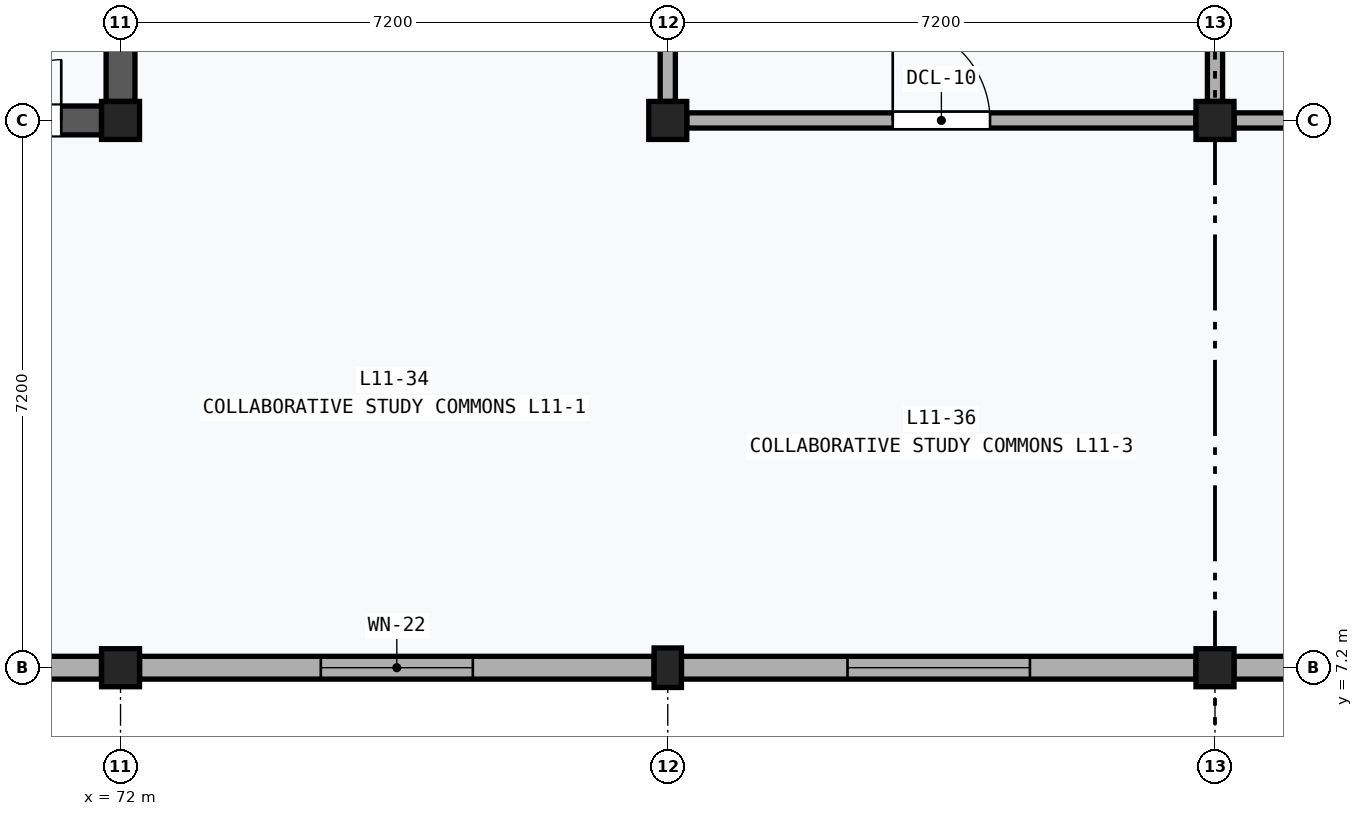
"""IFC4 building model, lengths in metres.
Left out: names, types, materials, properties, quantities, classifications, styles, units other than length and angle.
Written with IfcOpenShell. Run it as: python <this file> out.ifc"""

import sys

from ifc_helpers import new_model, si_unit, direction, frame, frame_2d, origin, origin_2d, place, context, subcontext, project, spatial, rectangle, extrude, element, fill, save


model = new_model("IFC4")
c1 = context("Model", 3, precision=1e-05, world=origin(), true_north=direction((0.0, 1.0)))
c2 = subcontext(c1, "Body", "Model", "MODEL_VIEW")
j1 = project(units=[si_unit("LENGTHUNIT", "METRE"), si_unit("PLANEANGLEUNIT", "RADIAN")], contexts=[c1])
p1 = place(None, origin())
s1 = spatial("IfcSite", under=j1, at=p1, CompositionType="ELEMENT")
p2 = place(p1, origin())
s2 = spatial("IfcBuilding", under=s1, at=p2, CompositionType="ELEMENT")
p3 = place(p2, frame((0.0, 0.0, 46.8)))
s3 = spatial("IfcBuildingStorey", under=s2, at=p3, CompositionType="ELEMENT", Elevation=46.8)
for number, where, z_axis, x_axis in (
    (1, (72.0, 7.2, 0.0), (0.0, 0.0, 1.0), (1.0, 0.0, 0.0)),
    (2, (72.0, 14.4, 0.0), (0.0, 0.0, 1.0), (1.0, 0.0, 0.0)),
):
    element("IfcColumn", number, at=place(p3, frame(where, z_axis=z_axis, x_axis=x_axis)), inside=s3, PredefinedType="COLUMN", context=c2, shape_type="SweptSolid", body=[
        extrude(rectangle(XDim=0.5, YDim=0.5, at=origin_2d()), origin(), (0.0, 0.0, 1.0), 4.2),
    ])
p4 = place(p3, frame((79.2, 7.2, 0.0), z_axis=(0.0, 0.0, 1.0), x_axis=(1.0, 0.0, 0.0)))
e3 = element("IfcColumn", 3, at=p4, inside=s3, PredefinedType="PILASTER", context=c2, shape_type="SweptSolid", body=[
    extrude(rectangle(XDim=0.36, YDim=0.52, at=origin_2d()), origin(), (0.0, 0.0, 1.0), 4.2),
])
for number, where, z_axis, x_axis in (
    (4, (79.2, 14.4, 0.0), (0.0, 0.0, 1.0), (1.0, 0.0, 0.0)),
    (5, (86.4, 7.2, 0.0), (0.0, 0.0, 1.0), (1.0, 0.0, 0.0)),
    (6, (86.4, 14.4, 0.0), (0.0, 0.0, 1.0), (1.0, 0.0, 0.0)),
):
    element("IfcColumn", number, at=place(p3, frame(where, z_axis=z_axis, x_axis=x_axis)), inside=s3, PredefinedType="COLUMN", context=c2, shape_type="SweptSolid", body=[
        extrude(rectangle(XDim=0.5, YDim=0.5, at=origin_2d()), origin(), (0.0, 0.0, 1.0), 4.2),
    ])
p5 = place(p3, frame((65.05, 7.2, 0.0), z_axis=(0.0, 0.0, 1.0), x_axis=(1.0, 0.0, 0.0)))
e7 = element("IfcWall", 7, at=p5, inside=s3, PredefinedType="SOLIDWALL", context=c2, shape_type="SweptSolid", body=[
    extrude(rectangle(XDim=6.7, YDim=0.3, at=frame_2d((3.35, 0.0))), origin(), (0.0, 0.0, 1.0), 3.37),
])
p6 = place(p5, frame((2.475, 0.0, 1.2)))
e8 = element("IfcOpeningElement", 8, at=p6, cuts=e7, PredefinedType="OPENING", context=c2, shape_type="SweptSolid", body=[
    extrude(rectangle(XDim=1.75, YDim=1.35, at=frame_2d((0.875, 0.675))), frame((0.0, 0.162, 0.0), z_axis=(0.0, -1.0, 0.0), x_axis=(1.0, 0.0, 0.0)), (0.0, 0.0, 1.0), 0.324),
])
p7 = place(p3, frame((72.25, 7.2, 0.0), z_axis=(0.0, 0.0, 1.0), x_axis=(1.0, 0.0, 0.0)))
e9 = element("IfcWall", 9, at=p7, inside=s3, PredefinedType="SOLIDWALL", context=c2, shape_type="SweptSolid", body=[
    extrude(rectangle(XDim=6.77, YDim=0.3, at=frame_2d((3.385, 0.0))), origin(), (0.0, 0.0, 1.0), 3.37),
])
p8 = place(p7, frame((2.385, 0.0, 0.7)))
e10 = element("IfcOpeningElement", 10, at=p8, cuts=e9, PredefinedType="OPENING", context=c2, shape_type="SweptSolid", body=[
    extrude(rectangle(XDim=2.0, YDim=2.2, at=frame_2d((1.0, 1.1))), frame((0.0, 0.162, 0.0), z_axis=(0.0, -1.0, 0.0), x_axis=(1.0, 0.0, 0.0)), (0.0, 0.0, 1.0), 0.324),
])
p9 = place(p3, frame((79.38, 7.2, 0.0), z_axis=(0.0, 0.0, 1.0), x_axis=(1.0, 0.0, 0.0)))
e11 = element("IfcWall", 11, at=p9, inside=s3, PredefinedType="SOLIDWALL", context=c2, shape_type="SweptSolid", body=[
    extrude(rectangle(XDim=6.77, YDim=0.3, at=frame_2d((3.385, 0.0))), origin(), (0.0, 0.0, 1.0), 3.37),
])
p10 = place(p9, frame((2.185, 0.0, 0.7)))
e12 = element("IfcOpeningElement", 12, at=p10, cuts=e11, PredefinedType="OPENING", context=c2, shape_type="SweptSolid", body=[
    extrude(rectangle(XDim=2.4, YDim=2.2, at=frame_2d((1.2, 1.1))), frame((0.0, 0.162, 0.0), z_axis=(0.0, -1.0, 0.0), x_axis=(1.0, 0.0, 0.0)), (0.0, 0.0, 1.0), 0.324),
])
p11 = place(p3, frame((86.65, 7.2, 0.0), z_axis=(0.0, 0.0, 1.0), x_axis=(1.0, 0.0, 0.0)))
e13 = element("IfcWall", 13, at=p11, inside=s3, PredefinedType="SOLIDWALL", context=c2, shape_type="SweptSolid", body=[
    extrude(rectangle(XDim=6.7, YDim=0.3, at=frame_2d((3.35, 0.0))), origin(), (0.0, 0.0, 1.0), 3.37),
])
p12 = place(p11, frame((1.95, 0.0, 0.7)))
e14 = element("IfcOpeningElement", 14, at=p12, cuts=e13, PredefinedType="OPENING", context=c2, shape_type="SweptSolid", body=[
    extrude(rectangle(XDim=2.8, YDim=2.2, at=frame_2d((1.4, 1.1))), frame((0.0, 0.162, 0.0), z_axis=(0.0, -1.0, 0.0), x_axis=(1.0, 0.0, 0.0)), (0.0, 0.0, 1.0), 0.324),
])
p13 = place(p3, frame((72.0, 14.65, 0.0), z_axis=(0.0, 0.0, 1.0), x_axis=(0.0, 1.0, 0.0)))
e15 = element("IfcWall", 15, at=p13, inside=s3, PredefinedType="SHEAR", context=c2, shape_type="SweptSolid", body=[
    extrude(rectangle(XDim=6.7, YDim=0.38, at=frame_2d((3.35, 0.0))), origin(), (0.0, 0.0, 1.0), 3.29),
])
p14 = place(p13, frame((2.2, 0.0, 0.0)))
e16 = element("IfcOpeningElement", 16, at=p14, cuts=e15, PredefinedType="OPENING", context=c2, shape_type="SweptSolid", body=[
    extrude(rectangle(XDim=1.6, YDim=2.2, at=frame_2d((0.8, 1.1))), frame((0.0, 0.202, 0.0), z_axis=(0.0, -1.0, 0.0), x_axis=(1.0, 0.0, 0.0)), (0.0, 0.0, 1.0), 0.404),
])
p15 = place(p3, frame((65.05, 14.4, 0.0), z_axis=(0.0, 0.0, 1.0), x_axis=(1.0, 0.0, 0.0)))
e17 = element("IfcWall", 17, at=p15, inside=s3, PredefinedType="SHEAR", context=c2, shape_type="SweptSolid", body=[
    extrude(rectangle(XDim=6.7, YDim=0.38, at=frame_2d((3.35, 0.0))), origin(), (0.0, 0.0, 1.0), 3.29),
])
p16 = place(p15, frame((4.57, 0.0, 0.0)))
e18 = element("IfcOpeningElement", 18, at=p16, cuts=e17, PredefinedType="OPENING", context=c2, shape_type="SweptSolid", body=[
    extrude(rectangle(XDim=1.6, YDim=2.2, at=frame_2d((0.8, 1.1))), frame((0.0, 0.202, 0.0), z_axis=(0.0, -1.0, 0.0), x_axis=(1.0, 0.0, 0.0)), (0.0, 0.0, 1.0), 0.404),
])
p17 = place(p3, frame((79.45, 14.4, 0.0), z_axis=(0.0, 0.0, 1.0), x_axis=(1.0, 0.0, 0.0)))
e19 = element("IfcWall", 19, at=p17, inside=s3, PredefinedType="PARTITIONING", context=c2, shape_type="SweptSolid", body=[
    extrude(rectangle(XDim=6.7, YDim=0.2, at=frame_2d((3.35, 0.0))), origin(), (0.0, 0.0, 1.0), 3.29),
])
p18 = place(p17, frame((2.71, 0.0, 0.0)))
e20 = element("IfcOpeningElement", 20, at=p18, cuts=e19, PredefinedType="OPENING", context=c2, shape_type="SweptSolid", body=[
    extrude(rectangle(XDim=1.28, YDim=2.28, at=frame_2d((0.64, 1.14))), frame((0.0, 0.112, 0.0), z_axis=(0.0, -1.0, 0.0), x_axis=(1.0, 0.0, 0.0)), (0.0, 0.0, 1.0), 0.224),
])
for number, where, z_axis, x_axis in (
    (21, (79.2, 14.65, 0.0), (0.0, 0.0, 1.0), (0.0, 1.0, 0.0)),
    (22, (86.4, 14.65, 0.0), (0.0, 0.0, 1.0), (0.0, 1.0, 0.0)),
):
    element("IfcWall", number, at=place(p3, frame(where, z_axis=z_axis, x_axis=x_axis)), inside=s3, PredefinedType="PARTITIONING", context=c2, shape_type="SweptSolid", body=[
        extrude(rectangle(XDim=6.7, YDim=0.2, at=frame_2d((3.35, 0.0))), origin(), (0.0, 0.0, 1.0), 3.29),
    ])
p19 = place(p3, frame((86.65, 14.4, 0.0), z_axis=(0.0, 0.0, 1.0), x_axis=(1.0, 0.0, 0.0)))
e23 = element("IfcWall", 23, at=p19, inside=s3, PredefinedType="PARTITIONING", context=c2, shape_type="SweptSolid", body=[
    extrude(rectangle(XDim=6.7, YDim=0.2, at=frame_2d((3.35, 0.0))), origin(), (0.0, 0.0, 1.0), 3.29),
])
p20 = place(p19, frame((2.83, 0.0, 0.0)))
e24 = element("IfcOpeningElement", 24, at=p20, cuts=e23, PredefinedType="OPENING", context=c2, shape_type="SweptSolid", body=[
    extrude(rectangle(XDim=1.04, YDim=2.14, at=frame_2d((0.52, 1.07))), frame((0.0, 0.112, 0.0), z_axis=(0.0, -1.0, 0.0), x_axis=(1.0, 0.0, 0.0)), (0.0, 0.0, 1.0), 0.224),
])
p21 = place(p8, origin())
e25 = element("IfcWindow", 25, at=p21, inside=s3, PartitioningType="SINGLE_PANEL", PredefinedType="WINDOW", context=c2, shape_type="SweptSolid", body=[
    extrude(rectangle(XDim=2.0, YDim=2.2, at=frame_2d((1.0, 1.1))), frame((0.0, 0.03, 0.0), z_axis=(0.0, -1.0, 0.0), x_axis=(1.0, 0.0, 0.0)), (0.0, 0.0, 1.0), 0.06),
])
fill(e10, e25)
p22 = place(p10, origin())
e26 = element("IfcWindow", 26, at=p22, inside=s3, PartitioningType="SINGLE_PANEL", PredefinedType="WINDOW", context=c2, shape_type="SweptSolid", body=[
    extrude(rectangle(XDim=2.4, YDim=2.2, at=frame_2d((1.2, 1.1))), frame((0.0, 0.03, 0.0), z_axis=(0.0, -1.0, 0.0), x_axis=(1.0, 0.0, 0.0)), (0.0, 0.0, 1.0), 0.06),
])
fill(e12, e26)
p23 = place(p16, origin())
e27 = element("IfcDoor", 27, at=p23, inside=s3, OperationType="DOUBLE_DOOR_SINGLE_SWING", PredefinedType="DOOR", context=c2, shape_type="SweptSolid", body=[
    extrude(rectangle(XDim=1.6, YDim=2.2, at=frame_2d((0.8, 1.1))), frame((0.0, 0.025, 0.0), z_axis=(0.0, -1.0, 0.0), x_axis=(1.0, 0.0, 0.0)), (0.0, 0.0, 1.0), 0.05),
])
fill(e18, e27)
p24 = place(p18, origin())
e28 = element("IfcDoor", 28, at=p24, inside=s3, OperationType="SINGLE_SWING_LEFT", PredefinedType="DOOR", context=c2, shape_type="SweptSolid", body=[
    extrude(rectangle(XDim=1.28, YDim=2.28, at=frame_2d((0.64, 1.14))), frame((0.0, 0.025, 0.0), z_axis=(0.0, -1.0, 0.0), x_axis=(1.0, 0.0, 0.0)), (0.0, 0.0, 1.0), 0.05),
])
fill(e20, e28)
save(model, sys.argv[1])
